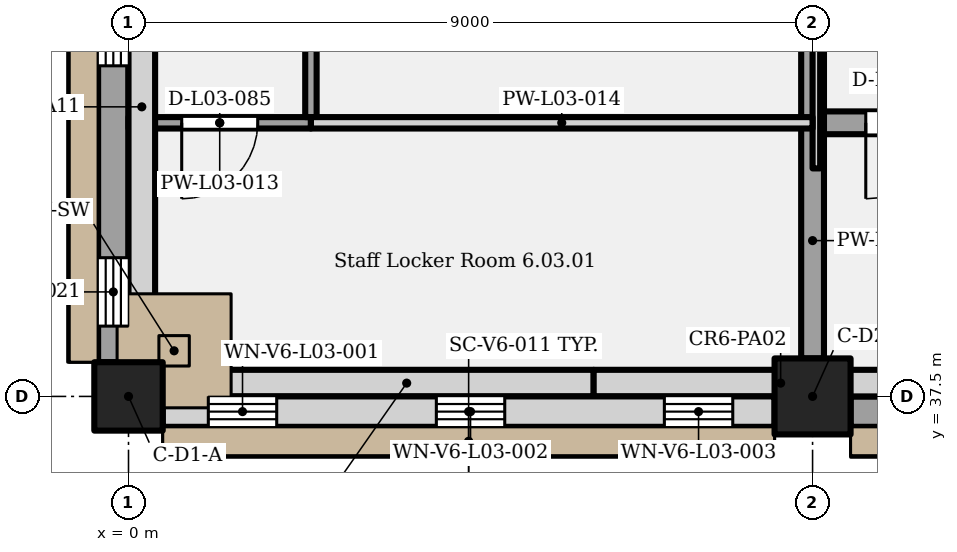
"""IFC4 building model, lengths in metres.
Left out: names, types, materials, properties, quantities, classifications, styles, units other than length and angle.
Written with IfcOpenShell. Run it as: python <this file> out.ifc"""

import sys

from ifc_helpers import new_model, si_unit, direction, frame, frame_2d, origin, origin_2d, place, context, subcontext, project, spatial, rectangle, extrude, element, fill, save


model = new_model("IFC4")
c1 = context("Model", 3, precision=1e-05, world=origin(), true_north=direction((0.0, 1.0)))
c2 = subcontext(c1, "Body", "Model", "MODEL_VIEW")
j1 = project(units=[si_unit("LENGTHUNIT", "METRE"), si_unit("PLANEANGLEUNIT", "RADIAN")], contexts=[c1])
p1 = place(None, origin())
s1 = spatial("IfcSite", under=j1, at=p1, CompositionType="ELEMENT")
p2 = place(p1, origin())
s2 = spatial("IfcBuilding", under=s1, at=p2, CompositionType="ELEMENT")
p3 = place(p2, frame((0.0, 0.0, 17.4)))
s3 = spatial("IfcBuildingStorey", under=s2, at=p3, CompositionType="ELEMENT", Elevation=17.4)
p4 = place(p3, frame((0.0, 37.5, 0.0), z_axis=(0.0, 0.0, 1.0), x_axis=(1.0, 0.0, 0.0)))
e1 = element("IfcColumn", 1, at=p4, inside=s3, PredefinedType="COLUMN", context=c2, shape_type="SweptSolid", body=[
    extrude(rectangle(XDim=0.9, YDim=0.9, at=origin_2d()), origin(), (0.0, 0.0, 1.0), 5.4),
])
p5 = place(p3, frame((9.0, 37.5, 0.0), z_axis=(0.0, 0.0, 1.0), x_axis=(1.0, 0.0, 0.0)))
e2 = element("IfcColumn", 2, at=p5, inside=s3, PredefinedType="COLUMN", context=c2, shape_type="SweptSolid", body=[
    extrude(rectangle(XDim=1.0, YDim=1.0, at=origin_2d()), origin(), (0.0, 0.0, 1.0), 5.4),
])
p6 = place(p3, frame((0.45, 37.3, 0.0), z_axis=(0.0, 0.0, 1.0), x_axis=(1.0, 0.0, 0.0)))
e3 = element("IfcWall", 3, at=p6, inside=s3, PredefinedType="SOLIDWALL", context=c2, shape_type="SweptSolid", body=[
    extrude(rectangle(XDim=8.05, YDim=0.4, at=frame_2d((4.025, 0.0))), origin(), (0.0, 0.0, 1.0), 5.15),
])
p7 = place(p6, frame((0.6, 0.0, 1.5)))
e4 = element("IfcOpeningElement", 4, at=p7, cuts=e3, PredefinedType="OPENING", context=c2, shape_type="SweptSolid", body=[
    extrude(rectangle(XDim=0.9, YDim=1.8, at=frame_2d((0.45, 0.9))), frame((0.0, 0.21, 0.0), z_axis=(0.0, -1.0, 0.0), x_axis=(1.0, 0.0, 0.0)), (0.0, 0.0, 1.0), 0.42),
])
p8 = place(p6, frame((3.6, 0.0, 1.5)))
e5 = element("IfcOpeningElement", 5, at=p8, cuts=e3, PredefinedType="OPENING", context=c2, shape_type="SweptSolid", body=[
    extrude(rectangle(XDim=0.9, YDim=1.8, at=frame_2d((0.45, 0.9))), frame((0.0, 0.21, 0.0), z_axis=(0.0, -1.0, 0.0), x_axis=(1.0, 0.0, 0.0)), (0.0, 0.0, 1.0), 0.42),
])
p9 = place(p6, frame((6.6, 0.0, 1.5)))
e6 = element("IfcOpeningElement", 6, at=p9, cuts=e3, PredefinedType="OPENING", context=c2, shape_type="SweptSolid", body=[
    extrude(rectangle(XDim=0.9, YDim=1.8, at=frame_2d((0.45, 0.9))), frame((0.0, 0.21, 0.0), z_axis=(0.0, -1.0, 0.0), x_axis=(1.0, 0.0, 0.0)), (0.0, 0.0, 1.0), 0.42),
])
p10 = place(p3, frame((9.5, 37.3, 0.0), z_axis=(0.0, 0.0, 1.0), x_axis=(1.0, 0.0, 0.0)))
e7 = element("IfcWall", 7, at=p10, inside=s3, PredefinedType="SOLIDWALL", context=c2, shape_type="SweptSolid", body=[
    extrude(rectangle(XDim=8.0, YDim=0.4, at=frame_2d((4.0, 0.0))), origin(), (0.0, 0.0, 1.0), 5.15),
])
p11 = place(p10, frame((1.0, 0.0, 0.9)))
e8 = element("IfcOpeningElement", 8, at=p11, cuts=e7, PredefinedType="OPENING", context=c2, shape_type="SweptSolid", body=[
    extrude(rectangle(XDim=6.0, YDim=3.3, at=frame_2d((3.0, 1.65))), frame((0.0, 0.21, 0.0), z_axis=(0.0, -1.0, 0.0), x_axis=(1.0, 0.0, 0.0)), (0.0, 0.0, 1.0), 0.42),
])
p12 = place(p3, frame((-0.2, 37.95, 0.0), z_axis=(0.0, 0.0, 1.0), x_axis=(0.0, 1.0, 0.0)))
e9 = element("IfcWall", 9, at=p12, inside=s3, PredefinedType="SOLIDWALL", context=c2, shape_type="SweptSolid", body=[
    extrude(rectangle(XDim=15.6, YDim=0.4, at=frame_2d((7.8, 0.0))), origin(), (0.0, 0.0, 1.0), 5.15),
])
p13 = place(p12, frame((3.9, 0.0, 0.9)))
e10 = element("IfcOpeningElement", 10, at=p13, cuts=e9, PredefinedType="OPENING", context=c2, shape_type="SweptSolid", body=[
    extrude(rectangle(XDim=1.2, YDim=2.4, at=frame_2d((0.6, 1.2))), frame((0.0, 0.21, 0.0), z_axis=(0.0, -1.0, 0.0), x_axis=(1.0, 0.0, 0.0)), (0.0, 0.0, 1.0), 0.42),
])
p14 = place(p12, frame((7.2, 0.0, 0.9)))
e11 = element("IfcOpeningElement", 11, at=p14, cuts=e9, PredefinedType="OPENING", context=c2, shape_type="SweptSolid", body=[
    extrude(rectangle(XDim=1.2, YDim=2.4, at=frame_2d((0.6, 1.2))), frame((0.0, 0.21, 0.0), z_axis=(0.0, -1.0, 0.0), x_axis=(1.0, 0.0, 0.0)), (0.0, 0.0, 1.0), 0.42),
])
p15 = place(p12, frame((10.5, 0.0, 0.9)))
e12 = element("IfcOpeningElement", 12, at=p15, cuts=e9, PredefinedType="OPENING", context=c2, shape_type="SweptSolid", body=[
    extrude(rectangle(XDim=1.2, YDim=2.4, at=frame_2d((0.6, 1.2))), frame((0.0, 0.21, 0.0), z_axis=(0.0, -1.0, 0.0), x_axis=(1.0, 0.0, 0.0)), (0.0, 0.0, 1.0), 0.42),
])
p16 = place(p12, frame((13.8, 0.0, 0.9)))
e13 = element("IfcOpeningElement", 13, at=p16, cuts=e9, PredefinedType="OPENING", context=c2, shape_type="SweptSolid", body=[
    extrude(rectangle(XDim=1.2, YDim=2.4, at=frame_2d((0.6, 1.2))), frame((0.0, 0.21, 0.0), z_axis=(0.0, -1.0, 0.0), x_axis=(1.0, 0.0, 0.0)), (0.0, 0.0, 1.0), 0.42),
])
p17 = place(p12, frame((0.475, 0.0, 1.5)))
e14 = element("IfcOpeningElement", 14, at=p17, cuts=e9, PredefinedType="OPENING", context=c2, shape_type="SweptSolid", body=[
    extrude(rectangle(XDim=0.9, YDim=1.8, at=frame_2d((0.45, 0.9))), frame((0.0, 0.21, 0.0), z_axis=(0.0, -1.0, 0.0), x_axis=(1.0, 0.0, 0.0)), (0.0, 0.0, 1.0), 0.42),
])
p18 = place(p3, frame((0.0, 38.1, 5.4), z_axis=(0.0, 0.0, 1.0), x_axis=(1.0, 0.0, 0.0)))
e15 = element("IfcWall", 15, at=p18, inside=s3, PredefinedType="SOLIDWALL", context=c2, shape_type="SweptSolid", body=[
    extrude(rectangle(XDim=1.2, YDim=1.2, at=frame_2d((0.6, 0.0))), origin(), (0.0, 0.0, 1.0), 2.4),
])
p19 = place(p3, frame((1.2, 37.675, 5.4), z_axis=(0.0, 0.0, 1.0), x_axis=(1.0, 0.0, 0.0)))
e16 = element("IfcWall", 16, at=p19, inside=s3, PredefinedType="PARAPET", context=c2, shape_type="SweptSolid", body=[
    extrude(rectangle(XDim=4.92, YDim=0.35, at=frame_2d((2.46, 0.0))), origin(), (0.0, 0.0, 1.0), 1.2),
])
p20 = place(p3, frame((6.12, 37.675, 5.4), z_axis=(0.0, 0.0, 1.0), x_axis=(1.0, 0.0, 0.0)))
e17 = element("IfcWall", 17, at=p20, inside=s3, PredefinedType="PARAPET", context=c2, shape_type="SweptSolid", body=[
    extrude(rectangle(XDim=4.92, YDim=0.35, at=frame_2d((2.46, 0.0))), origin(), (0.0, 0.0, 1.0), 1.5),
])
p21 = place(p3, frame((0.175, 38.7, 5.4), z_axis=(0.0, 0.0, 1.0), x_axis=(0.0, 1.0, 0.0)))
e18 = element("IfcWall", 18, at=p21, inside=s3, PredefinedType="PARAPET", context=c2, shape_type="SweptSolid", body=[
    extrude(rectangle(XDim=5.22, YDim=0.35, at=frame_2d((2.61, 0.0))), origin(), (0.0, 0.0, 1.0), 1.2),
])
p22 = place(p3, frame((9.05, 40.5, 5.4), z_axis=(0.0, 0.0, 1.0), x_axis=(0.0, 1.0, 0.0)))
e19 = element("IfcWall", 19, at=p22, inside=s3, PredefinedType="SOLIDWALL", context=c2, shape_type="SweptSolid", body=[
    extrude(rectangle(XDim=8.9, YDim=0.1, at=frame_2d((4.45, 0.0))), origin(), (0.0, 0.0, 1.0), 2.4),
])
p23 = place(p3, frame((0.0, 41.1, 0.0), z_axis=(0.0, 0.0, 1.0), x_axis=(1.0, 0.0, 0.0)))
e20 = element("IfcWall", 20, at=p23, inside=s3, PredefinedType="PARTITIONING", context=c2, shape_type="SweptSolid", body=[
    extrude(rectangle(XDim=2.4, YDim=0.15, at=frame_2d((1.2, 0.0))), origin(), (0.0, 0.0, 1.0), 5.15),
])
p24 = place(p23, frame((1.7, 0.0, 0.0), z_axis=(0.0, 0.0, 1.0), x_axis=(-1.0, 0.0, 0.0)))
e21 = element("IfcOpeningElement", 21, at=p24, cuts=e20, PredefinedType="OPENING", context=c2, shape_type="SweptSolid", body=[
    extrude(rectangle(XDim=1.0, YDim=2.1, at=frame_2d((0.5, 1.05))), frame((0.0, 0.085, 0.0), z_axis=(0.0, -1.0, 0.0), x_axis=(1.0, 0.0, 0.0)), (0.0, 0.0, 1.0), 0.17),
])
p25 = place(p3, frame((2.4, 41.1, 0.0), z_axis=(0.0, 0.0, 1.0), x_axis=(1.0, 0.0, 0.0)))
e22 = element("IfcWall", 22, at=p25, inside=s3, PredefinedType="PARTITIONING", context=c2, shape_type="SweptSolid", body=[
    extrude(rectangle(XDim=6.6, YDim=0.15, at=frame_2d((3.3, 0.0))), origin(), (0.0, 0.0, 1.0), 5.15),
])
p26 = place(p3, frame((9.0, 41.1, 0.0), z_axis=(0.0, 0.0, 1.0), x_axis=(1.0, 0.0, 0.0)))
e23 = element("IfcWall", 23, at=p26, inside=s3, PredefinedType="PARTITIONING", context=c2, shape_type="SweptSolid", body=[
    extrude(rectangle(XDim=8.85, YDim=0.3, at=frame_2d((4.425, 0.0))), origin(), (0.0, 0.0, 1.0), 5.15),
])
p27 = place(p26, frame((1.7, 0.0, 0.0), z_axis=(0.0, 0.0, 1.0), x_axis=(-1.0, 0.0, 0.0)))
e24 = element("IfcOpeningElement", 24, at=p27, cuts=e23, PredefinedType="OPENING", context=c2, shape_type="SweptSolid", body=[
    extrude(rectangle(XDim=1.0, YDim=2.1, at=frame_2d((0.5, 1.05))), frame((0.0, 0.16, 0.0), z_axis=(0.0, -1.0, 0.0), x_axis=(1.0, 0.0, 0.0)), (0.0, 0.0, 1.0), 0.32),
])
p28 = place(p3, frame((2.4, 41.175, 0.0), z_axis=(0.0, 0.0, 1.0), x_axis=(0.0, 1.0, 0.0)))
e25 = element("IfcWall", 25, at=p28, inside=s3, PredefinedType="PARTITIONING", context=c2, shape_type="SweptSolid", body=[
    extrude(rectangle(XDim=13.35, YDim=0.15, at=frame_2d((6.675, 0.0))), origin(), (0.0, 0.0, 1.0), 5.15),
])
p29 = place(p28, frame((12.375, 0.0, 0.0), z_axis=(0.0, 0.0, 1.0), x_axis=(-1.0, 0.0, 0.0)))
e26 = element("IfcOpeningElement", 26, at=p29, cuts=e25, PredefinedType="OPENING", context=c2, shape_type="SweptSolid", body=[
    extrude(rectangle(XDim=0.9, YDim=2.1, at=frame_2d((0.45, 1.05))), frame((0.0, 0.085, 0.0), z_axis=(0.0, -1.0, 0.0), x_axis=(1.0, 0.0, 0.0)), (0.0, 0.0, 1.0), 0.17),
])
p30 = place(p28, frame((9.375, 0.0, 0.0), z_axis=(0.0, 0.0, 1.0), x_axis=(-1.0, 0.0, 0.0)))
e27 = element("IfcOpeningElement", 27, at=p30, cuts=e25, PredefinedType="OPENING", context=c2, shape_type="SweptSolid", body=[
    extrude(rectangle(XDim=0.9, YDim=2.1, at=frame_2d((0.45, 1.05))), frame((0.0, 0.085, 0.0), z_axis=(0.0, -1.0, 0.0), x_axis=(1.0, 0.0, 0.0)), (0.0, 0.0, 1.0), 0.17),
])
p31 = place(p28, frame((6.425, 0.0, 0.0), z_axis=(0.0, 0.0, 1.0), x_axis=(-1.0, 0.0, 0.0)))
e28 = element("IfcOpeningElement", 28, at=p31, cuts=e25, PredefinedType="OPENING", context=c2, shape_type="SweptSolid", body=[
    extrude(rectangle(XDim=1.0, YDim=2.1, at=frame_2d((0.5, 1.05))), frame((0.0, 0.085, 0.0), z_axis=(0.0, -1.0, 0.0), x_axis=(1.0, 0.0, 0.0)), (0.0, 0.0, 1.0), 0.17),
])
p32 = place(p28, frame((2.675, 0.0, 0.0), z_axis=(0.0, 0.0, 1.0), x_axis=(-1.0, 0.0, 0.0)))
e29 = element("IfcOpeningElement", 29, at=p32, cuts=e25, PredefinedType="OPENING", context=c2, shape_type="SweptSolid", body=[
    extrude(rectangle(XDim=1.0, YDim=2.1, at=frame_2d((0.5, 1.05))), frame((0.0, 0.085, 0.0), z_axis=(0.0, -1.0, 0.0), x_axis=(1.0, 0.0, 0.0)), (0.0, 0.0, 1.0), 0.17),
])
p33 = place(p3, frame((9.0, 38.0, 0.0), z_axis=(0.0, 0.0, 1.0), x_axis=(0.0, 1.0, 0.0)))
e30 = element("IfcWall", 30, at=p33, inside=s3, PredefinedType="PARTITIONING", context=c2, shape_type="SweptSolid", body=[
    extrude(rectangle(XDim=3.1, YDim=0.3, at=frame_2d((1.55, 0.0))), origin(), (0.0, 0.0, 1.0), 4.2),
])
p34 = place(p3, frame((9.0, 41.1, 0.0), z_axis=(0.0, 0.0, 1.0), x_axis=(0.0, 1.0, 0.0)))
e31 = element("IfcWall", 31, at=p34, inside=s3, PredefinedType="PARTITIONING", context=c2, shape_type="SweptSolid", body=[
    extrude(rectangle(XDim=12.4, YDim=0.3, at=frame_2d((6.2, 0.0))), origin(), (0.0, 0.0, 1.0), 4.2),
])
p35 = place(p7, origin())
e32 = element("IfcWindow", 32, at=p35, inside=s3, PartitioningType="SINGLE_PANEL", PredefinedType="WINDOW", context=c2, shape_type="SweptSolid", body=[
    extrude(rectangle(XDim=0.9, YDim=1.8, at=frame_2d((0.45, 0.9))), frame((0.0, 0.03, 0.0), z_axis=(0.0, -1.0, 0.0), x_axis=(1.0, 0.0, 0.0)), (0.0, 0.0, 1.0), 0.06),
])
fill(e4, e32)
p36 = place(p8, origin())
e33 = element("IfcWindow", 33, at=p36, inside=s3, PartitioningType="SINGLE_PANEL", PredefinedType="WINDOW", context=c2, shape_type="SweptSolid", body=[
    extrude(rectangle(XDim=0.9, YDim=1.8, at=frame_2d((0.45, 0.9))), frame((0.0, 0.03, 0.0), z_axis=(0.0, -1.0, 0.0), x_axis=(1.0, 0.0, 0.0)), (0.0, 0.0, 1.0), 0.06),
])
fill(e5, e33)
p37 = place(p9, origin())
e34 = element("IfcWindow", 34, at=p37, inside=s3, PartitioningType="SINGLE_PANEL", PredefinedType="WINDOW", context=c2, shape_type="SweptSolid", body=[
    extrude(rectangle(XDim=0.9, YDim=1.8, at=frame_2d((0.45, 0.9))), frame((0.0, 0.03, 0.0), z_axis=(0.0, -1.0, 0.0), x_axis=(1.0, 0.0, 0.0)), (0.0, 0.0, 1.0), 0.06),
])
fill(e6, e34)
p38 = place(p13, origin())
e35 = element("IfcWindow", 35, at=p38, inside=s3, PartitioningType="SINGLE_PANEL", PredefinedType="WINDOW", context=c2, shape_type="SweptSolid", body=[
    extrude(rectangle(XDim=1.2, YDim=2.4, at=frame_2d((0.6, 1.2))), frame((0.0, 0.03, 0.0), z_axis=(0.0, -1.0, 0.0), x_axis=(1.0, 0.0, 0.0)), (0.0, 0.0, 1.0), 0.06),
])
fill(e10, e35)
p39 = place(p17, origin())
e36 = element("IfcWindow", 36, at=p39, inside=s3, PartitioningType="SINGLE_PANEL", PredefinedType="WINDOW", context=c2, shape_type="SweptSolid", body=[
    extrude(rectangle(XDim=0.9, YDim=1.8, at=frame_2d((0.45, 0.9))), frame((0.0, 0.03, 0.0), z_axis=(0.0, -1.0, 0.0), x_axis=(1.0, 0.0, 0.0)), (0.0, 0.0, 1.0), 0.06),
])
fill(e14, e36)
p40 = place(p24, origin())
e37 = element("IfcDoor", 37, at=p40, inside=s3, OperationType="SINGLE_SWING_RIGHT", PredefinedType="DOOR", context=c2, shape_type="SweptSolid", body=[
    extrude(rectangle(XDim=1.0, YDim=2.1, at=frame_2d((0.5, 1.05))), frame((0.0, 0.025, 0.0), z_axis=(0.0, -1.0, 0.0), x_axis=(1.0, 0.0, 0.0)), (0.0, 0.0, 1.0), 0.05),
])
fill(e21, e37)
p41 = place(p27, origin())
e38 = element("IfcDoor", 38, at=p41, inside=s3, OperationType="SINGLE_SWING_RIGHT", PredefinedType="DOOR", context=c2, shape_type="SweptSolid", body=[
    extrude(rectangle(XDim=1.0, YDim=2.1, at=frame_2d((0.5, 1.05))), frame((0.0, 0.025, 0.0), z_axis=(0.0, -1.0, 0.0), x_axis=(1.0, 0.0, 0.0)), (0.0, 0.0, 1.0), 0.05),
])
fill(e24, e38)
save(model, sys.argv[1])
